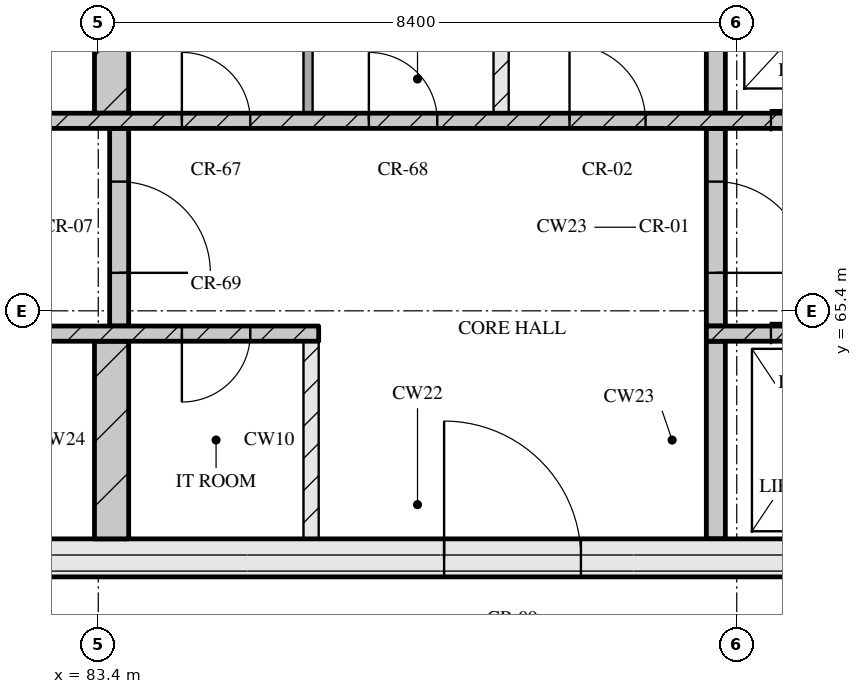
"""IFC4 building model, lengths in metres.
Left out: names, types, materials, properties, quantities, classifications, styles, units other than length and angle.
Written with IfcOpenShell. Run it as: python <this file> out.ifc"""

import sys

from ifc_helpers import new_model, si_unit, direction, frame, frame_2d, origin, place, context, subcontext, project, spatial, rectangle, extrude, element, fill, save


model = new_model("IFC4")
c1 = context("Model", 3, precision=1e-05, world=origin(), true_north=direction((0.0, 1.0)))
c2 = subcontext(c1, "Body", "Model", "MODEL_VIEW")
j1 = project(units=[si_unit("LENGTHUNIT", "METRE"), si_unit("PLANEANGLEUNIT", "RADIAN")], contexts=[c1])
p1 = place(None, origin())
s1 = spatial("IfcSite", under=j1, at=p1, CompositionType="ELEMENT")
p2 = place(p1, origin())
s2 = spatial("IfcBuilding", under=s1, at=p2, CompositionType="ELEMENT")
p3 = place(p2, frame((0.0, 0.0, 263.55)))
s3 = spatial("IfcBuildingStorey", under=s2, at=p3, CompositionType="ELEMENT", Elevation=263.55)
p4 = place(p3, frame((67.3, 62.15, 0.0), z_axis=(0.0, 0.0, 1.0), x_axis=(1.0, 0.0, 0.0)))
e1 = element("IfcWall", 1, at=p4, inside=s3, PredefinedType="SOLIDWALL", context=c2, shape_type="SweptSolid", body=[
    extrude(rectangle(XDim=40.6, YDim=0.5, at=frame_2d((20.3, 0.0))), origin(), (0.0, 0.0, 1.0), 3.32),
])
p5 = place(p4, frame((20.65, 0.0, 0.0)))
e2 = element("IfcOpeningElement", 2, at=p5, cuts=e1, PredefinedType="OPENING", context=c2, shape_type="SweptSolid", body=[
    extrude(rectangle(XDim=1.8, YDim=2.1, at=frame_2d((0.9, 1.05))), frame((0.0, 0.26, 0.0), z_axis=(0.0, -1.0, 0.0), x_axis=(1.0, 0.0, 0.0)), (0.0, 0.0, 1.0), 0.52),
])
p6 = place(p3, frame((83.575, 62.4, 0.0), z_axis=(0.0, 0.0, 1.0), x_axis=(0.0, 1.0, 0.0)))
e3 = element("IfcWall", 3, at=p6, inside=s3, PredefinedType="SOLIDWALL", context=c2, shape_type="SweptSolid", body=[
    extrude(rectangle(XDim=2.6, YDim=0.45, at=frame_2d((1.3, 0.0))), origin(), (0.0, 0.0, 1.0), 3.32),
])
p7 = place(p3, frame((86.2, 62.4, 0.0), z_axis=(0.0, 0.0, 1.0), x_axis=(0.0, 1.0, 0.0)))
e4 = element("IfcWall", 4, at=p7, inside=s3, PredefinedType="PARTITIONING", context=c2, shape_type="SweptSolid", body=[
    extrude(rectangle(XDim=2.6, YDim=0.2, at=frame_2d((1.3, 0.0))), origin(), (0.0, 0.0, 1.0), 3.32),
])
p8 = place(p3, frame((91.525, 62.4, 0.0), z_axis=(0.0, 0.0, 1.0), x_axis=(0.0, 1.0, 0.0)))
e5 = element("IfcWall", 5, at=p8, inside=s3, PredefinedType="SOLIDWALL", context=c2, shape_type="SweptSolid", body=[
    extrude(rectangle(XDim=2.6, YDim=0.25, at=frame_2d((1.3, 0.0))), origin(), (0.0, 0.0, 1.0), 3.32),
])
p9 = place(p3, frame((67.8, 65.1, 0.0), z_axis=(0.0, 0.0, 1.0), x_axis=(1.0, 0.0, 0.0)))
e6 = element("IfcWall", 6, at=p9, inside=s3, PredefinedType="SOLIDWALL", context=c2, shape_type="SweptSolid", body=[
    extrude(rectangle(XDim=18.5, YDim=0.2, at=frame_2d((9.25, 0.0))), origin(), (0.0, 0.0, 1.0), 3.32),
])
p10 = place(p9, frame((7.27, 0.0, 0.0)))
e7 = element("IfcOpeningElement", 7, at=p10, cuts=e6, PredefinedType="OPENING", context=c2, shape_type="SweptSolid", body=[
    extrude(rectangle(XDim=0.9, YDim=2.1, at=frame_2d((0.45, 1.05))), frame((0.0, 0.11, 0.0), z_axis=(0.0, -1.0, 0.0), x_axis=(1.0, 0.0, 0.0)), (0.0, 0.0, 1.0), 0.22),
])
p11 = place(p9, frame((11.45, 0.0, 0.0)))
e8 = element("IfcOpeningElement", 8, at=p11, cuts=e6, PredefinedType="OPENING", context=c2, shape_type="SweptSolid", body=[
    extrude(rectangle(XDim=0.9, YDim=2.1, at=frame_2d((0.45, 1.05))), frame((0.0, 0.11, 0.0), z_axis=(0.0, -1.0, 0.0), x_axis=(1.0, 0.0, 0.0)), (0.0, 0.0, 1.0), 0.22),
])
p12 = place(p9, frame((16.7, 0.0, 0.0)))
e9 = element("IfcOpeningElement", 9, at=p12, cuts=e6, PredefinedType="OPENING", context=c2, shape_type="SweptSolid", body=[
    extrude(rectangle(XDim=0.9, YDim=2.1, at=frame_2d((0.45, 1.05))), frame((0.0, 0.11, 0.0), z_axis=(0.0, -1.0, 0.0), x_axis=(1.0, 0.0, 0.0)), (0.0, 0.0, 1.0), 0.22),
])
p13 = place(p3, frame((91.4, 65.1, 0.0), z_axis=(0.0, 0.0, 1.0), x_axis=(1.0, 0.0, 0.0)))
e10 = element("IfcWall", 10, at=p13, inside=s3, PredefinedType="SOLIDWALL", context=c2, shape_type="SweptSolid", body=[
    extrude(rectangle(XDim=16.0, YDim=0.2, at=frame_2d((8.0, 0.0))), origin(), (0.0, 0.0, 1.0), 3.32),
])
p14 = place(p13, frame((0.85, 0.0, 0.0)))
e11 = element("IfcOpeningElement", 11, at=p14, cuts=e10, PredefinedType="OPENING", context=c2, shape_type="SweptSolid", body=[
    extrude(rectangle(XDim=1.1, YDim=2.1, at=frame_2d((0.55, 1.05))), frame((0.0, 0.11, 0.0), z_axis=(0.0, -1.0, 0.0), x_axis=(1.0, 0.0, 0.0)), (0.0, 0.0, 1.0), 0.22),
])
p15 = place(p13, frame((3.35, 0.0, 0.0)))
e12 = element("IfcOpeningElement", 12, at=p15, cuts=e10, PredefinedType="OPENING", context=c2, shape_type="SweptSolid", body=[
    extrude(rectangle(XDim=1.1, YDim=2.1, at=frame_2d((0.55, 1.05))), frame((0.0, 0.11, 0.0), z_axis=(0.0, -1.0, 0.0), x_axis=(1.0, 0.0, 0.0)), (0.0, 0.0, 1.0), 0.22),
])
p16 = place(p13, frame((5.85, 0.0, 0.0)))
e13 = element("IfcOpeningElement", 13, at=p16, cuts=e10, PredefinedType="OPENING", context=c2, shape_type="SweptSolid", body=[
    extrude(rectangle(XDim=1.1, YDim=2.1, at=frame_2d((0.55, 1.05))), frame((0.0, 0.11, 0.0), z_axis=(0.0, -1.0, 0.0), x_axis=(1.0, 0.0, 0.0)), (0.0, 0.0, 1.0), 0.22),
])
p17 = place(p13, frame((7.83, 0.0, 0.0)))
e14 = element("IfcOpeningElement", 14, at=p17, cuts=e10, PredefinedType="OPENING", context=c2, shape_type="SweptSolid", body=[
    extrude(rectangle(XDim=0.9, YDim=2.1, at=frame_2d((0.45, 1.05))), frame((0.0, 0.11, 0.0), z_axis=(0.0, -1.0, 0.0), x_axis=(1.0, 0.0, 0.0)), (0.0, 0.0, 1.0), 0.22),
])
p18 = place(p3, frame((83.675, 65.2, 0.0), z_axis=(0.0, 0.0, 1.0), x_axis=(0.0, 1.0, 0.0)))
e15 = element("IfcWall", 15, at=p18, inside=s3, PredefinedType="SOLIDWALL", context=c2, shape_type="SweptSolid", body=[
    extrude(rectangle(XDim=2.6, YDim=0.25, at=frame_2d((1.3, 0.0))), origin(), (0.0, 0.0, 1.0), 3.32),
])
p19 = place(p18, frame((0.7, 0.0, 0.0)))
e16 = element("IfcOpeningElement", 16, at=p19, cuts=e15, PredefinedType="OPENING", context=c2, shape_type="SweptSolid", body=[
    extrude(rectangle(XDim=1.2, YDim=2.1, at=frame_2d((0.6, 1.05))), frame((0.0, 0.135, 0.0), z_axis=(0.0, -1.0, 0.0), x_axis=(1.0, 0.0, 0.0)), (0.0, 0.0, 1.0), 0.27),
])
p20 = place(p3, frame((91.525, 65.2, 0.0), z_axis=(0.0, 0.0, 1.0), x_axis=(0.0, 1.0, 0.0)))
e17 = element("IfcWall", 17, at=p20, inside=s3, PredefinedType="SOLIDWALL", context=c2, shape_type="SweptSolid", body=[
    extrude(rectangle(XDim=2.6, YDim=0.25, at=frame_2d((1.3, 0.0))), origin(), (0.0, 0.0, 1.0), 3.32),
])
p21 = place(p20, frame((0.7, 0.0, 0.0)))
e18 = element("IfcOpeningElement", 18, at=p21, cuts=e17, PredefinedType="OPENING", context=c2, shape_type="SweptSolid", body=[
    extrude(rectangle(XDim=1.2, YDim=2.1, at=frame_2d((0.6, 1.05))), frame((0.0, 0.135, 0.0), z_axis=(0.0, -1.0, 0.0), x_axis=(1.0, 0.0, 0.0)), (0.0, 0.0, 1.0), 0.27),
])
p22 = place(p3, frame((76.05, 67.9, 0.0), z_axis=(0.0, 0.0, 1.0), x_axis=(1.0, 0.0, 0.0)))
e19 = element("IfcWall", 19, at=p22, inside=s3, PredefinedType="SOLIDWALL", context=c2, shape_type="SweptSolid", body=[
    extrude(rectangle(XDim=23.1, YDim=0.2, at=frame_2d((11.55, 0.0))), origin(), (0.0, 0.0, 1.0), 3.32),
])
p23 = place(p22, frame((1.4, 0.0, 0.0)))
e20 = element("IfcOpeningElement", 20, at=p23, cuts=e19, PredefinedType="OPENING", context=c2, shape_type="SweptSolid", body=[
    extrude(rectangle(XDim=0.9, YDim=2.1, at=frame_2d((0.45, 1.05))), frame((0.0, 0.11, 0.0), z_axis=(0.0, -1.0, 0.0), x_axis=(1.0, 0.0, 0.0)), (0.0, 0.0, 1.0), 0.22),
])
p24 = place(p22, frame((5.11, 0.0, 0.0)))
e21 = element("IfcOpeningElement", 21, at=p24, cuts=e19, PredefinedType="OPENING", context=c2, shape_type="SweptSolid", body=[
    extrude(rectangle(XDim=0.9, YDim=2.1, at=frame_2d((0.45, 1.05))), frame((0.0, 0.11, 0.0), z_axis=(0.0, -1.0, 0.0), x_axis=(1.0, 0.0, 0.0)), (0.0, 0.0, 1.0), 0.22),
])
p25 = place(p22, frame((8.45, 0.0, 0.0)))
e22 = element("IfcOpeningElement", 22, at=p25, cuts=e19, PredefinedType="OPENING", context=c2, shape_type="SweptSolid", body=[
    extrude(rectangle(XDim=0.9, YDim=2.1, at=frame_2d((0.45, 1.05))), frame((0.0, 0.11, 0.0), z_axis=(0.0, -1.0, 0.0), x_axis=(1.0, 0.0, 0.0)), (0.0, 0.0, 1.0), 0.22),
])
p26 = place(p22, frame((10.91, 0.0, 0.0)))
e23 = element("IfcOpeningElement", 23, at=p26, cuts=e19, PredefinedType="OPENING", context=c2, shape_type="SweptSolid", body=[
    extrude(rectangle(XDim=0.9, YDim=2.1, at=frame_2d((0.45, 1.05))), frame((0.0, 0.11, 0.0), z_axis=(0.0, -1.0, 0.0), x_axis=(1.0, 0.0, 0.0)), (0.0, 0.0, 1.0), 0.22),
])
p27 = place(p22, frame((13.55, 0.0, 0.0)))
e24 = element("IfcOpeningElement", 24, at=p27, cuts=e19, PredefinedType="OPENING", context=c2, shape_type="SweptSolid", body=[
    extrude(rectangle(XDim=1.0, YDim=2.1, at=frame_2d((0.5, 1.05))), frame((0.0, 0.11, 0.0), z_axis=(0.0, -1.0, 0.0), x_axis=(1.0, 0.0, 0.0)), (0.0, 0.0, 1.0), 0.22),
])
p28 = place(p22, frame((16.2, 0.0, 0.0)))
e25 = element("IfcOpeningElement", 25, at=p28, cuts=e19, PredefinedType="OPENING", context=c2, shape_type="SweptSolid", body=[
    extrude(rectangle(XDim=1.1, YDim=2.1, at=frame_2d((0.55, 1.05))), frame((0.0, 0.11, 0.0), z_axis=(0.0, -1.0, 0.0), x_axis=(1.0, 0.0, 0.0)), (0.0, 0.0, 1.0), 0.22),
])
p29 = place(p22, frame((18.7, 0.0, 0.0)))
e26 = element("IfcOpeningElement", 26, at=p29, cuts=e19, PredefinedType="OPENING", context=c2, shape_type="SweptSolid", body=[
    extrude(rectangle(XDim=1.1, YDim=2.1, at=frame_2d((0.55, 1.05))), frame((0.0, 0.11, 0.0), z_axis=(0.0, -1.0, 0.0), x_axis=(1.0, 0.0, 0.0)), (0.0, 0.0, 1.0), 0.22),
])
p30 = place(p22, frame((21.2, 0.0, 0.0)))
e27 = element("IfcOpeningElement", 27, at=p30, cuts=e19, PredefinedType="OPENING", context=c2, shape_type="SweptSolid", body=[
    extrude(rectangle(XDim=1.1, YDim=2.1, at=frame_2d((0.55, 1.05))), frame((0.0, 0.11, 0.0), z_axis=(0.0, -1.0, 0.0), x_axis=(1.0, 0.0, 0.0)), (0.0, 0.0, 1.0), 0.22),
])
p31 = place(p3, frame((83.575, 68.0, 0.0), z_axis=(0.0, 0.0, 1.0), x_axis=(0.0, 1.0, 0.0)))
e28 = element("IfcWall", 28, at=p31, inside=s3, PredefinedType="SOLIDWALL", context=c2, shape_type="SweptSolid", body=[
    extrude(rectangle(XDim=2.6, YDim=0.45, at=frame_2d((1.3, 0.0))), origin(), (0.0, 0.0, 1.0), 3.32),
])
p32 = place(p3, frame((86.16, 68.0, 0.0), z_axis=(0.0, 0.0, 1.0), x_axis=(0.0, 1.0, 0.0)))
e29 = element("IfcWall", 29, at=p32, inside=s3, PredefinedType="PARTITIONING", context=c2, shape_type="SweptSolid", body=[
    extrude(rectangle(XDim=2.6, YDim=0.12, at=frame_2d((1.3, 0.0))), origin(), (0.0, 0.0, 1.0), 3.32),
])
p33 = place(p3, frame((88.7, 68.0, 0.0), z_axis=(0.0, 0.0, 1.0), x_axis=(0.0, 1.0, 0.0)))
e30 = element("IfcWall", 30, at=p33, inside=s3, PredefinedType="PARTITIONING", context=c2, shape_type="SweptSolid", body=[
    extrude(rectangle(XDim=2.6, YDim=0.2, at=frame_2d((1.3, 0.0))), origin(), (0.0, 0.0, 1.0), 3.32),
])
p34 = place(p3, frame((91.525, 68.0, 0.0), z_axis=(0.0, 0.0, 1.0), x_axis=(0.0, 1.0, 0.0)))
e31 = element("IfcWall", 31, at=p34, inside=s3, PredefinedType="SOLIDWALL", context=c2, shape_type="SweptSolid", body=[
    extrude(rectangle(XDim=2.6, YDim=0.25, at=frame_2d((1.3, 0.0))), origin(), (0.0, 0.0, 1.0), 3.32),
])
p35 = place(p5, origin())
e32 = element("IfcDoor", 32, at=p35, inside=s3, OperationType="DOUBLE_DOOR_SINGLE_SWING", PredefinedType="DOOR", context=c2, shape_type="SweptSolid", body=[
    extrude(rectangle(XDim=1.8, YDim=2.1, at=frame_2d((0.9, 1.05))), frame((0.0, 0.025, 0.0), z_axis=(0.0, -1.0, 0.0), x_axis=(1.0, 0.0, 0.0)), (0.0, 0.0, 1.0), 0.05),
])
fill(e2, e32)
p36 = place(p12, origin())
e33 = element("IfcDoor", 33, at=p36, inside=s3, OperationType="SINGLE_SWING_RIGHT", PredefinedType="DOOR", context=c2, shape_type="SweptSolid", body=[
    extrude(rectangle(XDim=0.9, YDim=2.1, at=frame_2d((0.45, 1.05))), frame((0.0, 0.025, 0.0), z_axis=(0.0, -1.0, 0.0), x_axis=(1.0, 0.0, 0.0)), (0.0, 0.0, 1.0), 0.05),
])
fill(e9, e33)
p37 = place(p14, origin())
e34 = element("IfcDoor", 34, at=p37, inside=s3, OperationType="SLIDING_TO_LEFT", PredefinedType="DOOR", context=c2, shape_type="SweptSolid", body=[
    extrude(rectangle(XDim=1.1, YDim=2.1, at=frame_2d((0.55, 1.05))), frame((0.0, 0.025, 0.0), z_axis=(0.0, -1.0, 0.0), x_axis=(1.0, 0.0, 0.0)), (0.0, 0.0, 1.0), 0.05),
])
fill(e11, e34)
p38 = place(p19, origin())
e35 = element("IfcDoor", 35, at=p38, inside=s3, OperationType="SINGLE_SWING_RIGHT", PredefinedType="DOOR", context=c2, shape_type="SweptSolid", body=[
    extrude(rectangle(XDim=1.2, YDim=2.1, at=frame_2d((0.6, 1.05))), frame((0.0, 0.025, 0.0), z_axis=(0.0, -1.0, 0.0), x_axis=(1.0, 0.0, 0.0)), (0.0, 0.0, 1.0), 0.05),
])
fill(e16, e35)
p39 = place(p21, origin())
e36 = element("IfcDoor", 36, at=p39, inside=s3, OperationType="SINGLE_SWING_RIGHT", PredefinedType="DOOR", context=c2, shape_type="SweptSolid", body=[
    extrude(rectangle(XDim=1.2, YDim=2.1, at=frame_2d((0.6, 1.05))), frame((0.0, 0.025, 0.0), z_axis=(0.0, -1.0, 0.0), x_axis=(1.0, 0.0, 0.0)), (0.0, 0.0, 1.0), 0.05),
])
fill(e18, e36)
p40 = place(p25, origin())
e37 = element("IfcDoor", 37, at=p40, inside=s3, OperationType="SINGLE_SWING_LEFT", PredefinedType="DOOR", context=c2, shape_type="SweptSolid", body=[
    extrude(rectangle(XDim=0.9, YDim=2.1, at=frame_2d((0.45, 1.05))), frame((0.0, 0.025, 0.0), z_axis=(0.0, -1.0, 0.0), x_axis=(1.0, 0.0, 0.0)), (0.0, 0.0, 1.0), 0.05),
])
fill(e22, e37)
p41 = place(p26, origin())
e38 = element("IfcDoor", 38, at=p41, inside=s3, OperationType="SINGLE_SWING_LEFT", PredefinedType="DOOR", context=c2, shape_type="SweptSolid", body=[
    extrude(rectangle(XDim=0.9, YDim=2.1, at=frame_2d((0.45, 1.05))), frame((0.0, 0.025, 0.0), z_axis=(0.0, -1.0, 0.0), x_axis=(1.0, 0.0, 0.0)), (0.0, 0.0, 1.0), 0.05),
])
fill(e23, e38)
p42 = place(p27, origin())
e39 = element("IfcDoor", 39, at=p42, inside=s3, OperationType="SINGLE_SWING_LEFT", PredefinedType="DOOR", context=c2, shape_type="SweptSolid", body=[
    extrude(rectangle(XDim=1.0, YDim=2.1, at=frame_2d((0.5, 1.05))), frame((0.0, 0.025, 0.0), z_axis=(0.0, -1.0, 0.0), x_axis=(1.0, 0.0, 0.0)), (0.0, 0.0, 1.0), 0.05),
])
fill(e24, e39)
p43 = place(p28, origin())
e40 = element("IfcDoor", 40, at=p43, inside=s3, OperationType="SLIDING_TO_RIGHT", PredefinedType="DOOR", context=c2, shape_type="SweptSolid", body=[
    extrude(rectangle(XDim=1.1, YDim=2.1, at=frame_2d((0.55, 1.05))), frame((0.0, 0.025, 0.0), z_axis=(0.0, -1.0, 0.0), x_axis=(1.0, 0.0, 0.0)), (0.0, 0.0, 1.0), 0.05),
])
fill(e25, e40)
save(model, sys.argv[1])
